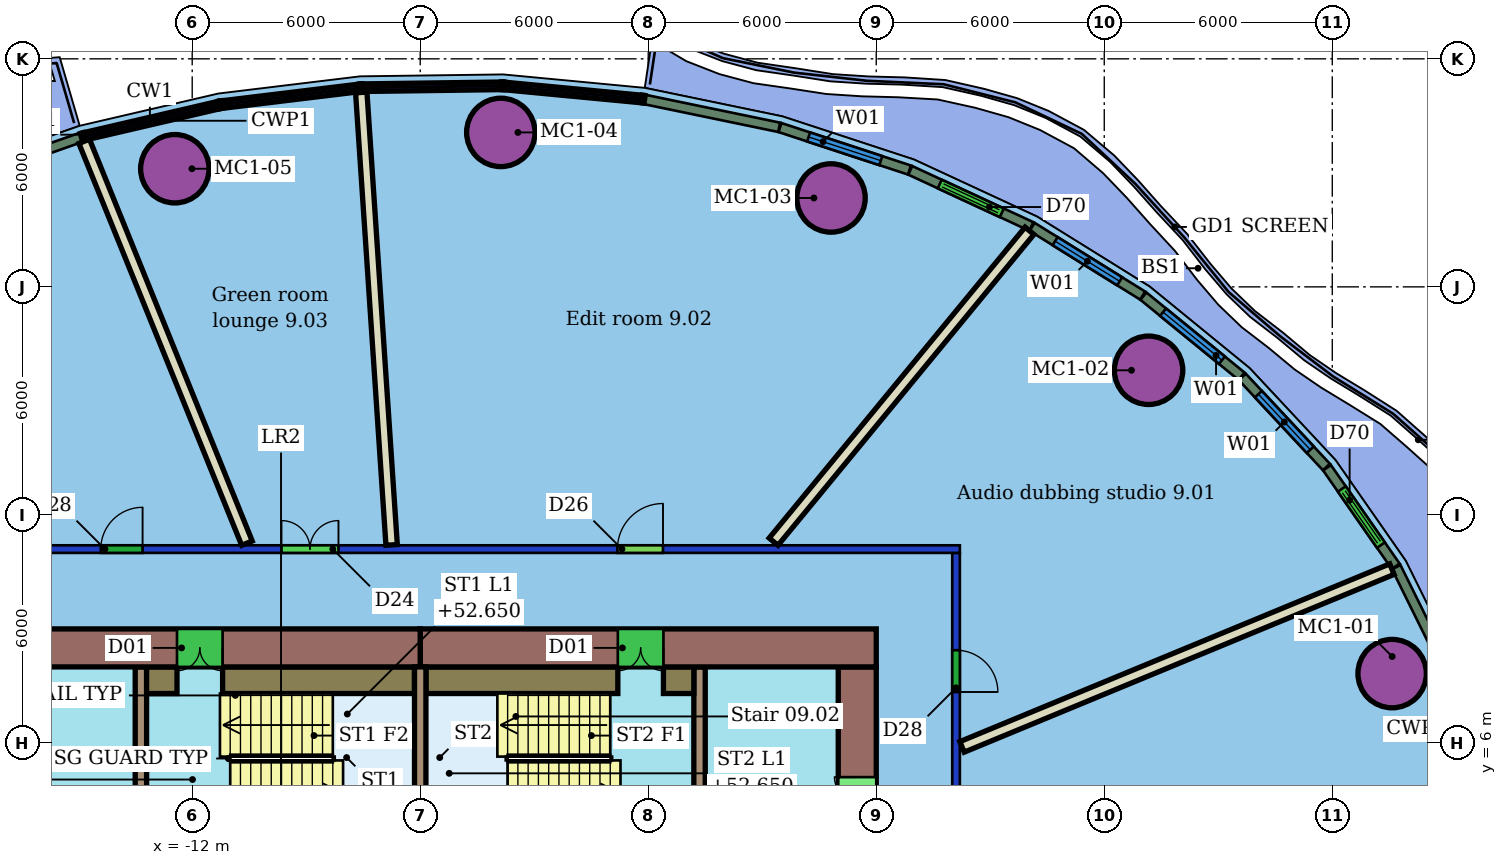
"""IFC4 building model, lengths in metres.
Left out: names, types, materials, properties, quantities, classifications, styles, units other than length and angle.
Written with IfcOpenShell. Run it as: python <this file> out.ifc"""

import sys

from ifc_helpers import new_model, si_unit, direction, frame, frame_2d, origin, origin_2d, place, context, subcontext, project, spatial, rectangle, hollow_circle, extrude, element, fill, save


model = new_model("IFC4")
c1 = context("Model", 3, precision=1e-05, world=origin(), true_north=direction((0.0, 1.0)))
c2 = subcontext(c1, "Body", "Model", "MODEL_VIEW")
j1 = project(units=[si_unit("LENGTHUNIT", "METRE"), si_unit("PLANEANGLEUNIT", "RADIAN")], contexts=[c1])
p1 = place(None, origin())
s1 = spatial("IfcSite", under=j1, at=p1, CompositionType="ELEMENT")
p2 = place(p1, origin())
s2 = spatial("IfcBuilding", under=s1, at=p2, CompositionType="ELEMENT")
p3 = place(p2, frame((0.0, 0.0, 50.8)))
s3 = spatial("IfcBuildingStorey", under=s2, at=p3, CompositionType="ELEMENT", Elevation=50.8)
for number, where, z_axis, x_axis in (
    (1, (19.575, 7.824, 0.0), (0.0, 0.0, 1.0), (1.0, 0.0, 0.0)),
    (2, (13.166, 15.805, 0.0), (0.0, 0.0, 1.0), (1.0, 0.0, 0.0)),
    (3, (4.81, 20.339, 0.0), (0.0, 0.0, 1.0), (1.0, 0.0, 0.0)),
    (4, (-3.879, 22.064, 0.0), (0.0, 0.0, 1.0), (1.0, 0.0, 0.0)),
    (5, (-12.458, 21.108, 0.0), (0.0, 0.0, 1.0), (1.0, 0.0, 0.0)),
):
    element("IfcColumn", number, at=place(p3, frame(where, z_axis=z_axis, x_axis=x_axis)), inside=s3, PredefinedType="COLUMN", context=c2, shape_type="SweptSolid", body=[
        extrude(hollow_circle(Radius=0.9, WallThickness=0.06, at=origin_2d()), origin(), (0.0, 0.0, 1.0), 3.55),
    ])
p4 = place(p3, frame((-20.2, 11.1, 0.0), z_axis=(0.0, 0.0, 1.0), x_axis=(1.0, 0.0, 0.0)))
e6 = element("IfcWall", 6, at=p4, inside=s3, PredefinedType="PARTITIONING", context=c2, shape_type="SweptSolid", body=[
    extrude(rectangle(XDim=28.4, YDim=0.2, at=frame_2d((14.2, 0.0))), origin(), (0.0, 0.0, 1.0), 2.85),
])
p5 = place(p4, frame((19.389, 0.0, 0.0)))
e7 = element("IfcOpeningElement", 7, at=p5, cuts=e6, PredefinedType="OPENING", context=c2, shape_type="SweptSolid", body=[
    extrude(rectangle(XDim=1.2, YDim=2.1, at=frame_2d((0.6, 1.05))), frame((0.0, 0.11, 0.0), z_axis=(0.0, -1.0, 0.0), x_axis=(1.0, 0.0, 0.0)), (0.0, 0.0, 1.0), 0.22),
])
p6 = place(p4, frame((10.549, 0.0, 0.0)))
e8 = element("IfcOpeningElement", 8, at=p6, cuts=e6, PredefinedType="OPENING", context=c2, shape_type="SweptSolid", body=[
    extrude(rectangle(XDim=1.5, YDim=2.1, at=frame_2d((0.75, 1.05))), frame((0.0, 0.11, 0.0), z_axis=(0.0, -1.0, 0.0), x_axis=(1.0, 0.0, 0.0)), (0.0, 0.0, 1.0), 0.22),
])
p7 = place(p4, frame((5.794, 0.0, 0.0)))
e9 = element("IfcOpeningElement", 9, at=p7, cuts=e6, PredefinedType="OPENING", context=c2, shape_type="SweptSolid", body=[
    extrude(rectangle(XDim=1.1, YDim=2.1, at=frame_2d((0.55, 1.05))), frame((0.0, 0.11, 0.0), z_axis=(0.0, -1.0, 0.0), x_axis=(1.0, 0.0, 0.0)), (0.0, 0.0, 1.0), 0.22),
])
p8 = place(p3, frame((8.1, 11.0, 0.0), z_axis=(0.0, 0.0, 1.0), x_axis=(0.0, -1.0, 0.0)))
e10 = element("IfcWall", 10, at=p8, inside=s3, PredefinedType="PARTITIONING", context=c2, shape_type="SweptSolid", body=[
    extrude(rectangle(XDim=22.0, YDim=0.2, at=frame_2d((11.0, 0.0))), origin(), (0.0, 0.0, 1.0), 2.85),
])
p9 = place(p8, frame((2.56, 0.0, 0.0)))
e11 = element("IfcOpeningElement", 11, at=p9, cuts=e10, PredefinedType="OPENING", context=c2, shape_type="SweptSolid", body=[
    extrude(rectangle(XDim=1.1, YDim=2.1, at=frame_2d((0.55, 1.05))), frame((0.0, 0.11, 0.0), z_axis=(0.0, -1.0, 0.0), x_axis=(1.0, 0.0, 0.0)), (0.0, 0.0, 1.0), 0.22),
])
p10 = place(p8, frame((15.468, 0.0, 0.0)))
e12 = element("IfcOpeningElement", 12, at=p10, cuts=e10, PredefinedType="OPENING", context=c2, shape_type="SweptSolid", body=[
    extrude(rectangle(XDim=1.8, YDim=2.1, at=frame_2d((0.9, 1.05))), frame((0.0, 0.11, 0.0), z_axis=(0.0, -1.0, 0.0), x_axis=(1.0, 0.0, 0.0)), (0.0, 0.0, 1.0), 0.22),
])
p11 = place(p8, frame((7.453, 0.0, 0.0)))
e13 = element("IfcOpeningElement", 13, at=p11, cuts=e10, PredefinedType="OPENING", context=c2, shape_type="SweptSolid", body=[
    extrude(rectangle(XDim=0.9, YDim=2.1, at=frame_2d((0.45, 1.05))), frame((0.0, 0.11, 0.0), z_axis=(0.0, -1.0, 0.0), x_axis=(1.0, 0.0, 0.0)), (0.0, 0.0, 1.0), 0.22),
])
p12 = place(p3, frame((19.569, 10.573, 0.0), z_axis=(0.0, 0.0, 1.0), x_axis=(-0.924113266053, -0.382118661551, 0.0)))
e14 = element("IfcWall", 14, at=p12, inside=s3, PredefinedType="PARTITIONING", context=c2, shape_type="SweptSolid", body=[
    extrude(rectangle(XDim=12.241, YDim=0.3, at=frame_2d((6.121, 0.0))), origin(), (0.0, 0.0, 1.0), 3.55),
])
p13 = place(p3, frame((10.032, 19.475, 0.0), z_axis=(0.0, 0.0, 1.0), x_axis=(-0.635573968838, -0.772039979623, 0.0)))
e15 = element("IfcWall", 15, at=p13, inside=s3, PredefinedType="PARTITIONING", context=c2, shape_type="SweptSolid", body=[
    extrude(rectangle(XDim=10.594, YDim=0.3, at=frame_2d((5.297, 0.0))), origin(), (0.0, 0.0, 1.0), 3.55),
])
p14 = place(p3, frame((-7.552, 23.115, 0.0), z_axis=(0.0, 0.0, 1.0), x_axis=(0.06696714259, -0.997755181301, 0.0)))
e16 = element("IfcWall", 16, at=p14, inside=s3, PredefinedType="PARTITIONING", context=c2, shape_type="SweptSolid", body=[
    extrude(rectangle(XDim=11.932, YDim=0.3, at=frame_2d((5.966, 0.0))), origin(), (0.0, 0.0, 1.0), 3.55),
])
p15 = place(p3, frame((-14.842, 21.83, 0.0), z_axis=(0.0, 0.0, 1.0), x_axis=(0.375419963659, -0.926854816509, 0.0)))
e17 = element("IfcWall", 17, at=p15, inside=s3, PredefinedType="PARTITIONING", context=c2, shape_type="SweptSolid", body=[
    extrude(rectangle(XDim=11.408, YDim=0.3, at=frame_2d((5.704, 0.0))), origin(), (0.0, 0.0, 1.0), 3.55),
])
p16 = place(p3, frame((21.036, 7.892, 0.0), z_axis=(0.0, 0.0, 1.0), x_axis=(-0.443751201737, 0.896150027036, 0.0)))
e18 = element("IfcWall", 18, at=p16, inside=s3, PredefinedType="SOLIDWALL", context=c2, shape_type="SweptSolid", body=[
    extrude(rectangle(XDim=3.049, YDim=0.25, at=frame_2d((1.524, 0.0))), origin(), (0.0, 0.0, 1.0), 3.15),
])
p17 = place(p3, frame((19.669, 10.647, 0.0), z_axis=(0.0, 0.0, 1.0), x_axis=(-0.571854103807, 0.820355340056, 0.0)))
e19 = element("IfcWall", 19, at=p17, inside=s3, PredefinedType="SOLIDWALL", context=c2, shape_type="SweptSolid", body=[
    extrude(rectangle(XDim=3.161, YDim=0.25, at=frame_2d((1.58, 0.0))), origin(), (0.0, 0.0, 1.0), 3.15),
])
p18 = place(p17, frame((0.68, 0.0, 0.0)))
e20 = element("IfcOpeningElement", 20, at=p18, cuts=e19, PredefinedType="OPENING", context=c2, shape_type="SweptSolid", body=[
    extrude(rectangle(XDim=1.8, YDim=2.4, at=frame_2d((0.9, 1.2))), frame((0.0, 0.135, 0.0), z_axis=(0.0, -1.0, 0.0), x_axis=(1.0, 0.0, 0.0)), (0.0, 0.0, 1.0), 0.27),
])
p19 = place(p3, frame((17.846, 13.26, 0.0), z_axis=(0.0, 0.0, 1.0), x_axis=(-0.682457674527, 0.730925114139, 0.0)))
e21 = element("IfcWall", 21, at=p19, inside=s3, PredefinedType="SOLIDWALL", context=c2, shape_type="SweptSolid", body=[
    extrude(rectangle(XDim=3.244, YDim=0.25, at=frame_2d((1.622, 0.0))), origin(), (0.0, 0.0, 1.0), 3.15),
])
p20 = place(p19, frame((0.622, 0.0, 0.8)))
e22 = element("IfcOpeningElement", 22, at=p20, cuts=e21, PredefinedType="OPENING", context=c2, shape_type="SweptSolid", body=[
    extrude(rectangle(XDim=2.0, YDim=2.2, at=frame_2d((1.0, 1.1))), frame((0.0, 0.135, 0.0), z_axis=(0.0, -1.0, 0.0), x_axis=(1.0, 0.0, 0.0)), (0.0, 0.0, 1.0), 0.27),
])
p21 = place(p3, frame((15.614, 15.648, 0.0), z_axis=(0.0, 0.0, 1.0), x_axis=(-0.774781963818, 0.632228525569, 0.0)))
e23 = element("IfcWall", 23, at=p21, inside=s3, PredefinedType="SOLIDWALL", context=c2, shape_type="SweptSolid", body=[
    extrude(rectangle(XDim=3.334, YDim=0.25, at=frame_2d((1.667, 0.0))), origin(), (0.0, 0.0, 1.0), 3.15),
])
p22 = place(p21, frame((0.667, 0.0, 0.8)))
e24 = element("IfcOpeningElement", 24, at=p22, cuts=e23, PredefinedType="OPENING", context=c2, shape_type="SweptSolid", body=[
    extrude(rectangle(XDim=2.0, YDim=2.2, at=frame_2d((1.0, 1.1))), frame((0.0, 0.135, 0.0), z_axis=(0.0, -1.0, 0.0), x_axis=(1.0, 0.0, 0.0)), (0.0, 0.0, 1.0), 0.27),
])
p23 = place(p3, frame((13.011, 17.771, 0.0), z_axis=(0.0, 0.0, 1.0), x_axis=(-0.849344913238, 0.527838250184, 0.0)))
e25 = element("IfcWall", 25, at=p23, inside=s3, PredefinedType="SOLIDWALL", context=c2, shape_type="SweptSolid", body=[
    extrude(rectangle(XDim=3.426, YDim=0.25, at=frame_2d((1.713, 0.0))), origin(), (0.0, 0.0, 1.0), 3.15),
])
p24 = place(p23, frame((0.713, 0.0, 0.8)))
e26 = element("IfcOpeningElement", 26, at=p24, cuts=e25, PredefinedType="OPENING", context=c2, shape_type="SweptSolid", body=[
    extrude(rectangle(XDim=2.0, YDim=2.2, at=frame_2d((1.0, 1.1))), frame((0.0, 0.135, 0.0), z_axis=(0.0, -1.0, 0.0), x_axis=(1.0, 0.0, 0.0)), (0.0, 0.0, 1.0), 0.27),
])
p25 = place(p3, frame((10.081, 19.59, 0.0), z_axis=(0.0, 0.0, 1.0), x_axis=(-0.907313194359, 0.420455428484, 0.0)))
e27 = element("IfcWall", 27, at=p25, inside=s3, PredefinedType="SOLIDWALL", context=c2, shape_type="SweptSolid", body=[
    extrude(rectangle(XDim=3.511, YDim=0.25, at=frame_2d((1.756, 0.0))), origin(), (0.0, 0.0, 1.0), 3.15),
])
p26 = place(p25, frame((0.856, 0.0, 0.0)))
e28 = element("IfcOpeningElement", 28, at=p26, cuts=e27, PredefinedType="OPENING", context=c2, shape_type="SweptSolid", body=[
    extrude(rectangle(XDim=1.8, YDim=2.4, at=frame_2d((0.9, 1.2))), frame((0.0, 0.135, 0.0), z_axis=(0.0, -1.0, 0.0), x_axis=(1.0, 0.0, 0.0)), (0.0, 0.0, 1.0), 0.27),
])
p27 = place(p3, frame((6.874, 21.074, 0.0), z_axis=(0.0, 0.0, 1.0), x_axis=(-0.950176997657, 0.311710880662, 0.0)))
e29 = element("IfcWall", 29, at=p27, inside=s3, PredefinedType="SOLIDWALL", context=c2, shape_type="SweptSolid", body=[
    extrude(rectangle(XDim=3.586, YDim=0.25, at=frame_2d((1.793, 0.0))), origin(), (0.0, 0.0, 1.0), 3.15),
])
p28 = place(p27, frame((0.793, 0.0, 0.8)))
e30 = element("IfcOpeningElement", 30, at=p28, cuts=e29, PredefinedType="OPENING", context=c2, shape_type="SweptSolid", body=[
    extrude(rectangle(XDim=2.0, YDim=2.2, at=frame_2d((1.0, 1.1))), frame((0.0, 0.135, 0.0), z_axis=(0.0, -1.0, 0.0), x_axis=(1.0, 0.0, 0.0)), (0.0, 0.0, 1.0), 0.27),
])
p29 = place(p3, frame((3.445, 22.198, 0.0), z_axis=(0.0, 0.0, 1.0), x_axis=(-0.979196383513, 0.202914865188, 0.0)))
e31 = element("IfcWall", 31, at=p29, inside=s3, PredefinedType="SOLIDWALL", context=c2, shape_type="SweptSolid", body=[
    extrude(rectangle(XDim=3.602, YDim=0.25, at=frame_2d((1.801, 0.0))), origin(), (0.0, 0.0, 1.0), 3.15),
])
p30 = place(p3, frame((-14.929, 21.932, 0.0), z_axis=(0.0, 0.0, 1.0), x_axis=(-0.943313962697, -0.331901744168, 0.0)))
e32 = element("IfcWall", 32, at=p30, inside=s3, PredefinedType="SOLIDWALL", context=c2, shape_type="SweptSolid", body=[
    extrude(rectangle(XDim=3.602, YDim=0.25, at=frame_2d((1.801, 0.0))), origin(), (0.0, 0.0, 1.0), 3.15),
])
p31 = place(p3, frame((6.0, 8.5, 0.0), z_axis=(0.0, 0.0, 1.0), x_axis=(-1.0, 0.0, 0.0)))
e33 = element("IfcWall", 33, at=p31, inside=s3, PredefinedType="SHEAR", context=c2, shape_type="SweptSolid", body=[
    extrude(rectangle(XDim=12.0, YDim=1.0, at=frame_2d((6.0, 0.0))), origin(), (0.0, 0.0, 1.0), 3.4),
])
p32 = place(p31, frame((5.6, 0.0, 0.0)))
e34 = element("IfcOpeningElement", 34, at=p32, cuts=e33, PredefinedType="OPENING", context=c2, shape_type="SweptSolid", body=[
    extrude(rectangle(XDim=1.2, YDim=2.1, at=frame_2d((0.6, 1.05))), frame((0.0, 0.51, 0.0), z_axis=(0.0, -1.0, 0.0), x_axis=(1.0, 0.0, 0.0)), (0.0, 0.0, 1.0), 1.02),
])
p33 = place(p3, frame((-6.0, 8.5, 0.0), z_axis=(0.0, 0.0, 1.0), x_axis=(-1.0, 0.0, 0.0)))
e35 = element("IfcWall", 35, at=p33, inside=s3, PredefinedType="SHEAR", context=c2, shape_type="SweptSolid", body=[
    extrude(rectangle(XDim=12.0, YDim=1.0, at=frame_2d((6.0, 0.0))), origin(), (0.0, 0.0, 1.0), 3.4),
])
p34 = place(p33, frame((5.2, 0.0, 0.0)))
e36 = element("IfcOpeningElement", 36, at=p34, cuts=e35, PredefinedType="OPENING", context=c2, shape_type="SweptSolid", body=[
    extrude(rectangle(XDim=1.2, YDim=2.1, at=frame_2d((0.6, 1.05))), frame((0.0, 0.51, 0.0), z_axis=(0.0, -1.0, 0.0), x_axis=(1.0, 0.0, 0.0)), (0.0, 0.0, 1.0), 1.02),
])
p35 = place(p3, frame((5.5, -8.0, 0.0), z_axis=(0.0, 0.0, 1.0), x_axis=(0.0, 1.0, 0.0)))
e37 = element("IfcWall", 37, at=p35, inside=s3, PredefinedType="SHEAR", context=c2, shape_type="SweptSolid", body=[
    extrude(rectangle(XDim=16.0, YDim=1.0, at=frame_2d((8.0, 0.0))), origin(), (0.0, 0.0, 1.0), 3.4),
])
p36 = place(p35, frame((2.9, 0.0, 0.0)))
e38 = element("IfcOpeningElement", 38, at=p36, cuts=e37, PredefinedType="OPENING", context=c2, shape_type="SweptSolid", body=[
    extrude(rectangle(XDim=1.2, YDim=2.1, at=frame_2d((0.6, 1.05))), frame((0.0, 0.51, 0.0), z_axis=(0.0, -1.0, 0.0), x_axis=(1.0, 0.0, 0.0)), (0.0, 0.0, 1.0), 1.02),
])
p37 = place(p35, frame((11.9, 0.0, 0.0)))
e39 = element("IfcOpeningElement", 39, at=p37, cuts=e37, PredefinedType="OPENING", context=c2, shape_type="SweptSolid", body=[
    extrude(rectangle(XDim=1.2, YDim=2.1, at=frame_2d((0.6, 1.05))), frame((0.0, 0.51, 0.0), z_axis=(0.0, -1.0, 0.0), x_axis=(1.0, 0.0, 0.0)), (0.0, 0.0, 1.0), 1.02),
])
p38 = place(p3, frame((-13.35, 8.0, 0.0), z_axis=(0.0, 0.0, 1.0), x_axis=(0.0, -1.0, 0.0)))
e40 = element("IfcWall", 40, at=p38, inside=s3, PredefinedType="SHEAR", context=c2, shape_type="SweptSolid", body=[
    extrude(rectangle(XDim=16.0, YDim=0.3, at=frame_2d((8.0, 0.0))), origin(), (0.0, 0.0, 1.0), 3.4),
])
p39 = place(p38, frame((7.25, 0.0, 0.0)))
e41 = element("IfcOpeningElement", 41, at=p39, cuts=e40, PredefinedType="OPENING", context=c2, shape_type="SweptSolid", body=[
    extrude(rectangle(XDim=1.5, YDim=2.1, at=frame_2d((0.75, 1.05))), frame((0.0, 0.16, 0.0), z_axis=(0.0, -1.0, 0.0), x_axis=(1.0, 0.0, 0.0)), (0.0, 0.0, 1.0), 0.32),
])
p40 = place(p3, frame((1.35, -8.0, 0.0), z_axis=(0.0, 0.0, 1.0), x_axis=(0.0, 1.0, 0.0)))
e42 = element("IfcWall", 42, at=p40, inside=s3, PredefinedType="SHEAR", context=c2, shape_type="SweptSolid", body=[
    extrude(rectangle(XDim=16.0, YDim=0.3, at=frame_2d((8.0, 0.0))), origin(), (0.0, 0.0, 1.0), 3.4),
])
p41 = place(p40, frame((1.91, 0.0, 0.0)))
e43 = element("IfcOpeningElement", 43, at=p41, cuts=e42, PredefinedType="OPENING", context=c2, shape_type="SweptSolid", body=[
    extrude(rectangle(XDim=1.0, YDim=2.1, at=frame_2d((0.5, 1.05))), frame((0.0, 0.16, 0.0), z_axis=(0.0, -1.0, 0.0), x_axis=(1.0, 0.0, 0.0)), (0.0, 0.0, 1.0), 0.32),
])
p42 = place(p40, frame((7.25, 0.0, 0.0)))
e44 = element("IfcOpeningElement", 44, at=p42, cuts=e42, PredefinedType="OPENING", context=c2, shape_type="SweptSolid", body=[
    extrude(rectangle(XDim=1.5, YDim=2.1, at=frame_2d((0.75, 1.05))), frame((0.0, 0.16, 0.0), z_axis=(0.0, -1.0, 0.0), x_axis=(1.0, 0.0, 0.0)), (0.0, 0.0, 1.0), 0.32),
])
p43 = place(p3, frame((-6.0, 3.88, 0.0), z_axis=(0.0, 0.0, 1.0), x_axis=(0.0, 1.0, 0.0)))
e45 = element("IfcWall", 45, at=p43, inside=s3, PredefinedType="SHEAR", context=c2, shape_type="SweptSolid", body=[
    extrude(rectangle(XDim=4.12, YDim=0.3, at=frame_2d((2.06, 0.0))), origin(), (0.0, 0.0, 1.0), 3.4),
])
p44 = place(p3, frame((-13.2, 7.65, 0.0), z_axis=(0.0, 0.0, 1.0), x_axis=(1.0, 0.0, 0.0)))
e46 = element("IfcWall", 46, at=p44, inside=s3, PredefinedType="SHEAR", context=c2, shape_type="SweptSolid", body=[
    extrude(rectangle(XDim=0.8, YDim=0.7, at=frame_2d((0.4, 0.0))), origin(), (0.0, 0.0, 1.0), 3.4),
])
for number, where, z_axis, x_axis in (
    (47, (-11.2, 7.65, 0.0), (0.0, 0.0, 1.0), (1.0, 0.0, 0.0)),
    (48, (-5.85, 7.65, 0.0), (0.0, 0.0, 1.0), (1.0, 0.0, 0.0)),
):
    element("IfcWall", number, at=place(p3, frame(where, z_axis=z_axis, x_axis=x_axis)), inside=s3, PredefinedType="SHEAR", context=c2, shape_type="SweptSolid", body=[
        extrude(rectangle(XDim=5.05, YDim=0.7, at=frame_2d((2.525, 0.0))), origin(), (0.0, 0.0, 1.0), 3.4),
    ])
p45 = place(p3, frame((0.4, 7.65, 0.0), z_axis=(0.0, 0.0, 1.0), x_axis=(1.0, 0.0, 0.0)))
e49 = element("IfcWall", 49, at=p45, inside=s3, PredefinedType="SHEAR", context=c2, shape_type="SweptSolid", body=[
    extrude(rectangle(XDim=0.8, YDim=0.7, at=frame_2d((0.4, 0.0))), origin(), (0.0, 0.0, 1.0), 3.4),
])
p46 = place(p9, origin())
e50 = element("IfcDoor", 50, at=p46, inside=s3, OperationType="SINGLE_SWING_RIGHT", PredefinedType="DOOR", context=c2, shape_type="SweptSolid", body=[
    extrude(rectangle(XDim=1.1, YDim=2.1, at=frame_2d((0.55, 1.05))), frame((0.0, 0.025, 0.0), z_axis=(0.0, -1.0, 0.0), x_axis=(1.0, 0.0, 0.0)), (0.0, 0.0, 1.0), 0.05),
])
fill(e11, e50)
p47 = place(p5, origin())
e51 = element("IfcDoor", 51, at=p47, inside=s3, OperationType="SINGLE_SWING_RIGHT", PredefinedType="DOOR", context=c2, shape_type="SweptSolid", body=[
    extrude(rectangle(XDim=1.2, YDim=2.1, at=frame_2d((0.6, 1.05))), frame((0.0, 0.025, 0.0), z_axis=(0.0, -1.0, 0.0), x_axis=(1.0, 0.0, 0.0)), (0.0, 0.0, 1.0), 0.05),
])
fill(e7, e51)
p48 = place(p6, origin())
e52 = element("IfcDoor", 52, at=p48, inside=s3, OperationType="DOUBLE_DOOR_SINGLE_SWING", PredefinedType="DOOR", context=c2, shape_type="SweptSolid", body=[
    extrude(rectangle(XDim=1.5, YDim=2.1, at=frame_2d((0.75, 1.05))), frame((0.0, 0.025, 0.0), z_axis=(0.0, -1.0, 0.0), x_axis=(1.0, 0.0, 0.0)), (0.0, 0.0, 1.0), 0.05),
])
fill(e8, e52)
p49 = place(p7, origin())
e53 = element("IfcDoor", 53, at=p49, inside=s3, OperationType="SINGLE_SWING_RIGHT", PredefinedType="DOOR", context=c2, shape_type="SweptSolid", body=[
    extrude(rectangle(XDim=1.1, YDim=2.1, at=frame_2d((0.55, 1.05))), frame((0.0, 0.025, 0.0), z_axis=(0.0, -1.0, 0.0), x_axis=(1.0, 0.0, 0.0)), (0.0, 0.0, 1.0), 0.05),
])
fill(e9, e53)
p50 = place(p18, origin())
e54 = element("IfcDoor", 54, at=p50, inside=s3, OperationType="DOUBLE_DOOR_SLIDING", PredefinedType="DOOR", context=c2, shape_type="SweptSolid", body=[
    extrude(rectangle(XDim=1.8, YDim=2.4, at=frame_2d((0.9, 1.2))), frame((0.0, 0.025, 0.0), z_axis=(0.0, -1.0, 0.0), x_axis=(1.0, 0.0, 0.0)), (0.0, 0.0, 1.0), 0.05),
])
fill(e20, e54)
p51 = place(p20, origin())
e55 = element("IfcWindow", 55, at=p51, inside=s3, PartitioningType="SINGLE_PANEL", PredefinedType="WINDOW", context=c2, shape_type="SweptSolid", body=[
    extrude(rectangle(XDim=2.0, YDim=2.2, at=frame_2d((1.0, 1.1))), frame((0.0, 0.03, 0.0), z_axis=(0.0, -1.0, 0.0), x_axis=(1.0, 0.0, 0.0)), (0.0, 0.0, 1.0), 0.06),
])
fill(e22, e55)
p52 = place(p22, origin())
e56 = element("IfcWindow", 56, at=p52, inside=s3, PartitioningType="SINGLE_PANEL", PredefinedType="WINDOW", context=c2, shape_type="SweptSolid", body=[
    extrude(rectangle(XDim=2.0, YDim=2.2, at=frame_2d((1.0, 1.1))), frame((0.0, 0.03, 0.0), z_axis=(0.0, -1.0, 0.0), x_axis=(1.0, 0.0, 0.0)), (0.0, 0.0, 1.0), 0.06),
])
fill(e24, e56)
p53 = place(p24, origin())
e57 = element("IfcWindow", 57, at=p53, inside=s3, PartitioningType="SINGLE_PANEL", PredefinedType="WINDOW", context=c2, shape_type="SweptSolid", body=[
    extrude(rectangle(XDim=2.0, YDim=2.2, at=frame_2d((1.0, 1.1))), frame((0.0, 0.03, 0.0), z_axis=(0.0, -1.0, 0.0), x_axis=(1.0, 0.0, 0.0)), (0.0, 0.0, 1.0), 0.06),
])
fill(e26, e57)
p54 = place(p26, origin())
e58 = element("IfcDoor", 58, at=p54, inside=s3, OperationType="DOUBLE_DOOR_SLIDING", PredefinedType="DOOR", context=c2, shape_type="SweptSolid", body=[
    extrude(rectangle(XDim=1.8, YDim=2.4, at=frame_2d((0.9, 1.2))), frame((0.0, 0.025, 0.0), z_axis=(0.0, -1.0, 0.0), x_axis=(1.0, 0.0, 0.0)), (0.0, 0.0, 1.0), 0.05),
])
fill(e28, e58)
p55 = place(p28, origin())
e59 = element("IfcWindow", 59, at=p55, inside=s3, PartitioningType="SINGLE_PANEL", PredefinedType="WINDOW", context=c2, shape_type="SweptSolid", body=[
    extrude(rectangle(XDim=2.0, YDim=2.2, at=frame_2d((1.0, 1.1))), frame((0.0, 0.03, 0.0), z_axis=(0.0, -1.0, 0.0), x_axis=(1.0, 0.0, 0.0)), (0.0, 0.0, 1.0), 0.06),
])
fill(e30, e59)
p56 = place(p32, origin())
e60 = element("IfcDoor", 60, at=p56, inside=s3, OperationType="DOUBLE_DOOR_SINGLE_SWING", PredefinedType="NOTDEFINED", context=c2, shape_type="SweptSolid", body=[
    extrude(rectangle(XDim=1.2, YDim=2.1, at=frame_2d((0.6, 1.05))), frame((0.0, 0.025, 0.0), z_axis=(0.0, -1.0, 0.0), x_axis=(1.0, 0.0, 0.0)), (0.0, 0.0, 1.0), 0.05),
])
fill(e34, e60)
p57 = place(p34, origin())
e61 = element("IfcDoor", 61, at=p57, inside=s3, OperationType="DOUBLE_DOOR_SINGLE_SWING", PredefinedType="NOTDEFINED", context=c2, shape_type="SweptSolid", body=[
    extrude(rectangle(XDim=1.2, YDim=2.1, at=frame_2d((0.6, 1.05))), frame((0.0, 0.025, 0.0), z_axis=(0.0, -1.0, 0.0), x_axis=(1.0, 0.0, 0.0)), (0.0, 0.0, 1.0), 0.05),
])
fill(e36, e61)
p58 = place(p37, origin())
e62 = element("IfcDoor", 62, at=p58, inside=s3, OperationType="DOUBLE_DOOR_SINGLE_SWING", PredefinedType="NOTDEFINED", context=c2, shape_type="SweptSolid", body=[
    extrude(rectangle(XDim=1.2, YDim=2.1, at=frame_2d((0.6, 1.05))), frame((0.0, 0.025, 0.0), z_axis=(0.0, -1.0, 0.0), x_axis=(1.0, 0.0, 0.0)), (0.0, 0.0, 1.0), 0.05),
])
fill(e39, e62)
save(model, sys.argv[1])
